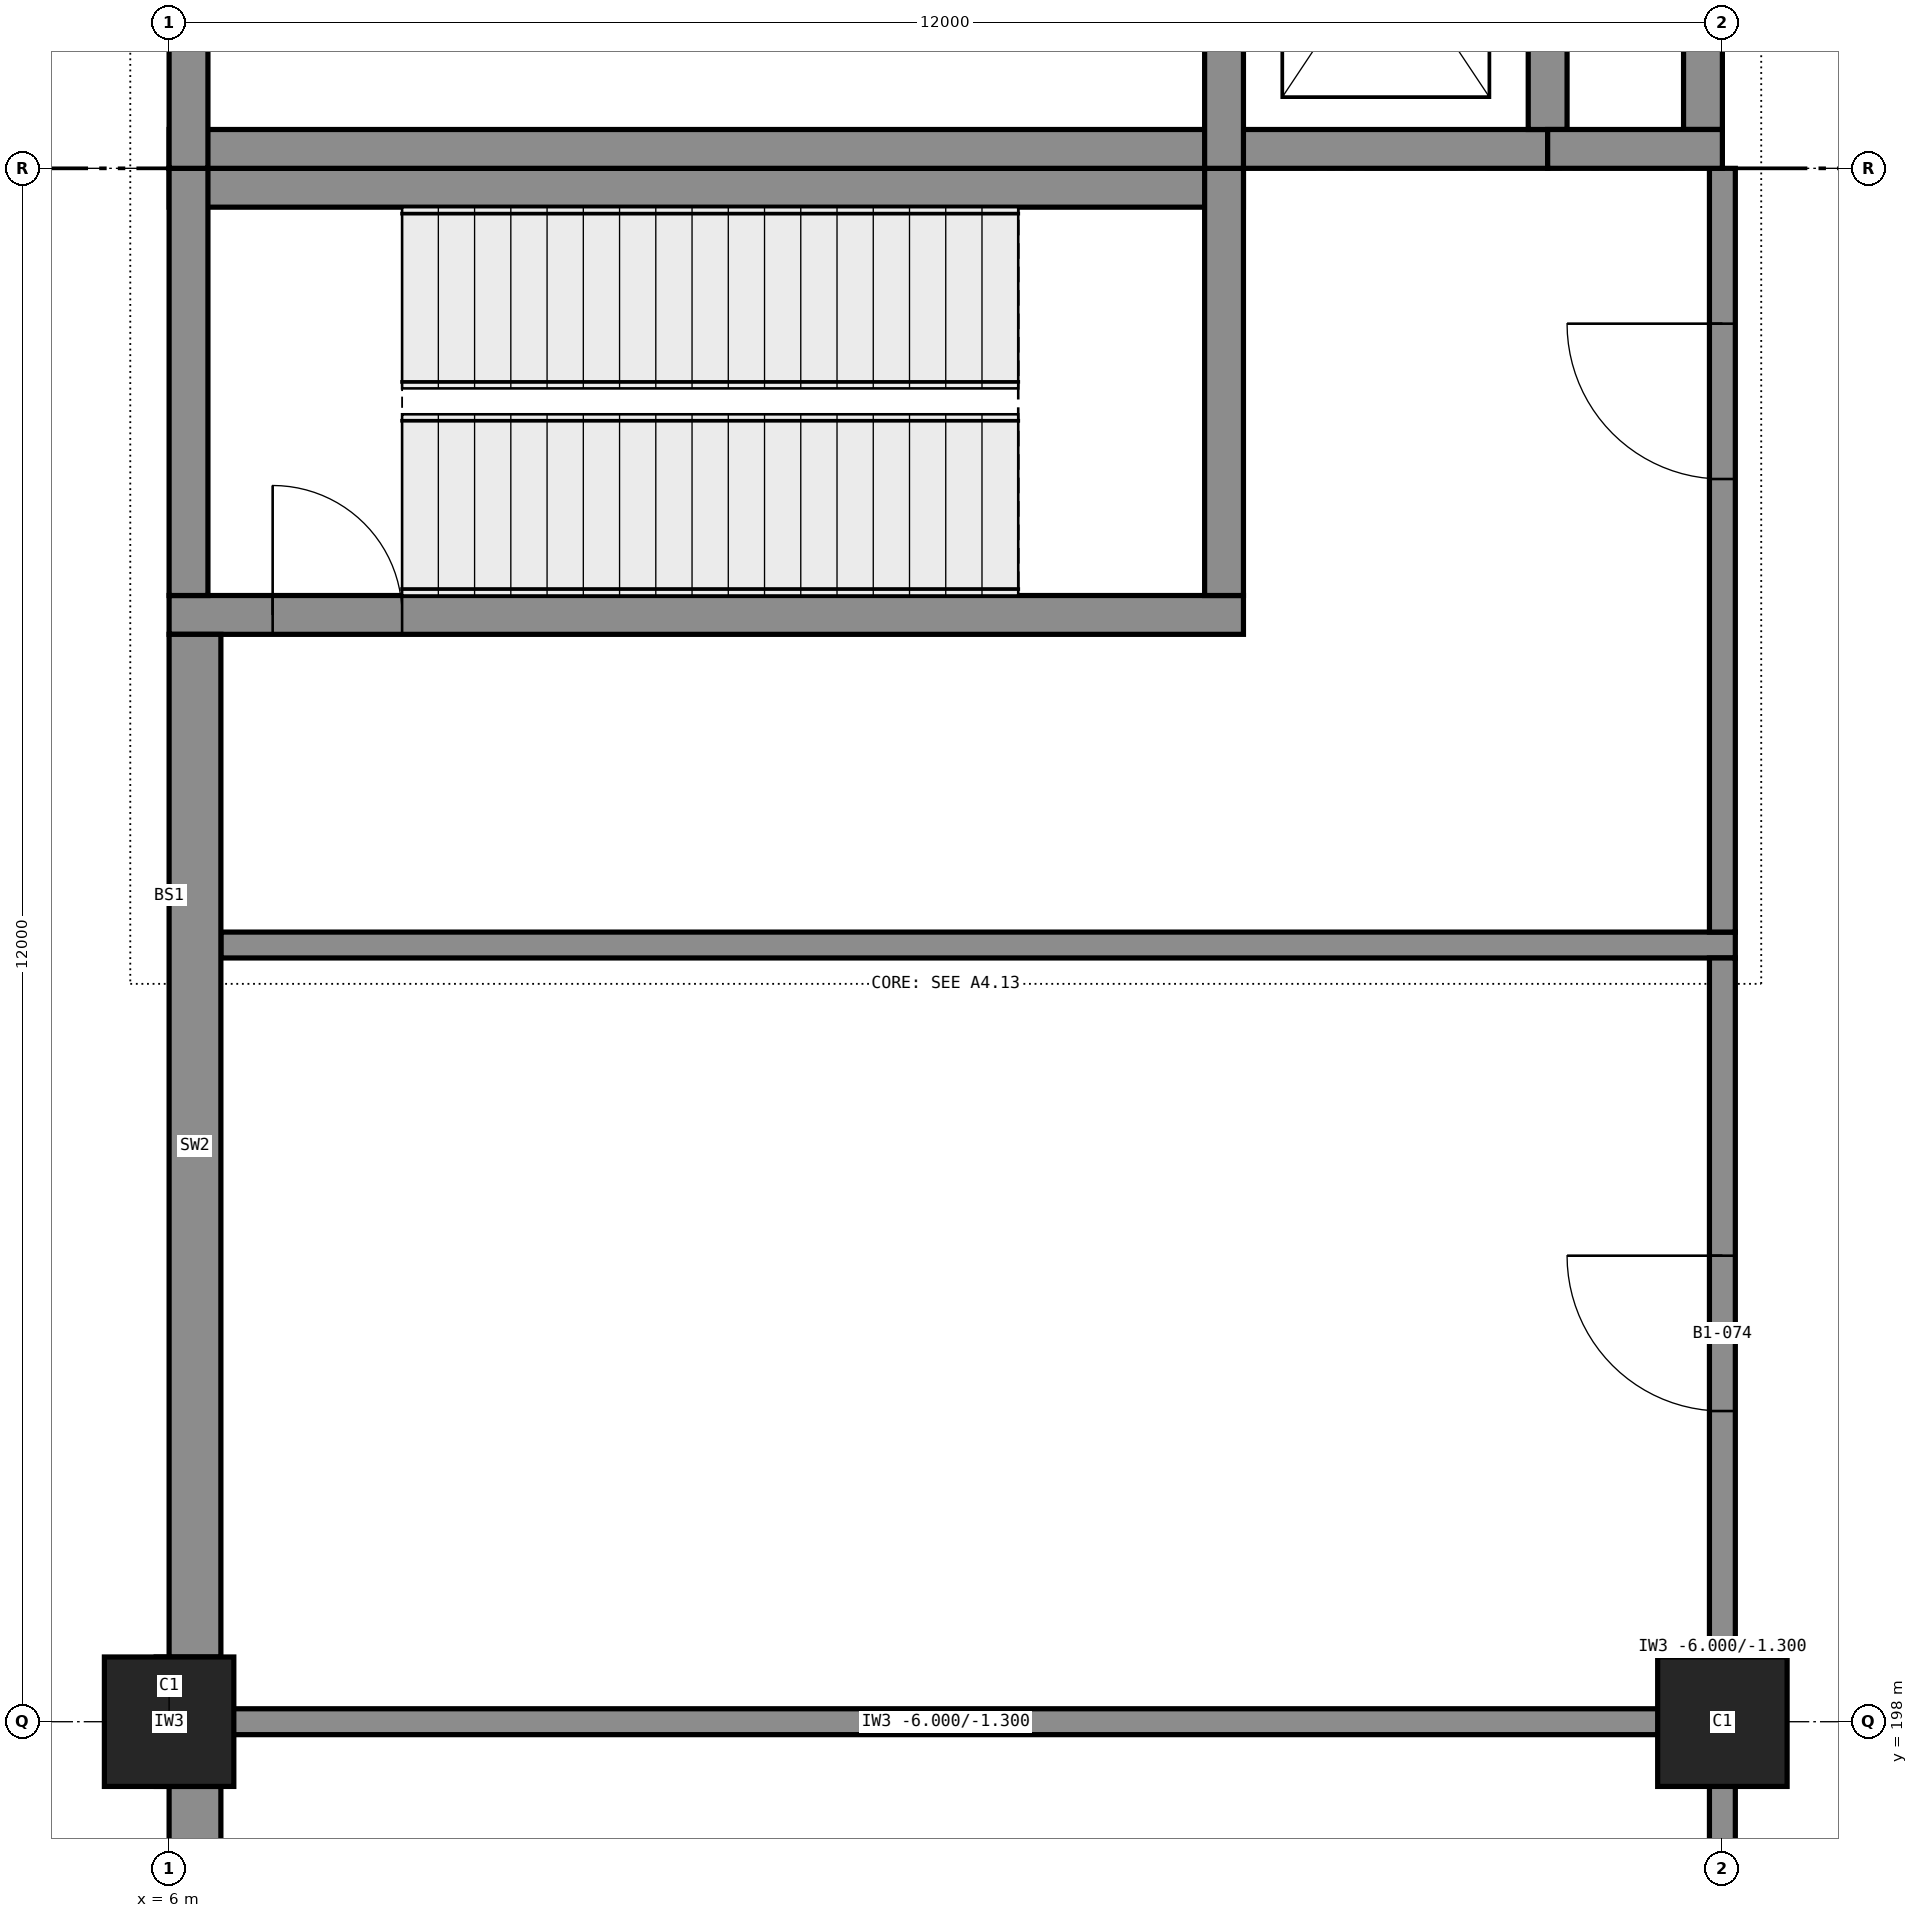
"""IFC4 building model, lengths in metres.
Left out: names, types, materials, properties, quantities, classifications, styles, units other than length and angle.
Written with IfcOpenShell. Run it as: python <this file> out.ifc"""

import sys

from ifc_helpers import new_model, si_unit, direction, frame, frame_2d, origin, origin_2d, place, context, subcontext, project, spatial, rectangle, extrude, element, fill, save


model = new_model("IFC4")
c1 = context("Model", 3, precision=1e-05, world=origin(), true_north=direction((0.0, 1.0)))
c2 = subcontext(c1, "Body", "Model", "MODEL_VIEW")
j1 = project(units=[si_unit("LENGTHUNIT", "METRE"), si_unit("PLANEANGLEUNIT", "RADIAN")], contexts=[c1])
p1 = place(None, origin())
s1 = spatial("IfcSite", under=j1, at=p1, CompositionType="ELEMENT")
p2 = place(p1, origin())
s2 = spatial("IfcBuilding", under=s1, at=p2, CompositionType="ELEMENT")
p3 = place(p2, frame((0.0, 0.0, -6.0)))
s3 = spatial("IfcBuildingStorey", under=s2, at=p3, CompositionType="ELEMENT", Elevation=-6.0)
for number, where, z_axis, x_axis in (
    (1, (6.0, 198.0, -0.4), (0.0, 0.0, 1.0), (1.0, 0.0, 0.0)),
    (2, (18.0, 198.0, -0.4), (0.0, 0.0, 1.0), (1.0, 0.0, 0.0)),
):
    element("IfcColumn", number, at=place(p3, frame(where, z_axis=z_axis, x_axis=x_axis)), inside=s3, PredefinedType="COLUMN", context=c2, shape_type="SweptSolid", body=[
        extrude(rectangle(XDim=1.0, YDim=1.0, at=origin_2d()), origin(), (0.0, 0.0, 1.0), 6.4),
    ])
p4 = place(p3, frame((6.0, 206.55, 0.0), z_axis=(0.0, 0.0, 1.0), x_axis=(1.0, 0.0, 0.0)))
e3 = element("IfcWall", 3, at=p4, inside=s3, PredefinedType="SHEAR", context=c2, shape_type="SweptSolid", body=[
    extrude(rectangle(XDim=8.3, YDim=0.3, at=frame_2d((4.15, 0.0))), origin(), (0.0, 0.0, 1.0), 5.7),
])
p5 = place(p4, frame((0.8, 0.0, 0.0)))
e4 = element("IfcOpeningElement", 4, at=p5, cuts=e3, PredefinedType="OPENING", context=c2, shape_type="SweptSolid", body=[
    extrude(rectangle(XDim=1.0, YDim=2.1, at=frame_2d((0.5, 1.05))), frame((0.0, 0.16, 0.0), z_axis=(0.0, -1.0, 0.0), x_axis=(1.0, 0.0, 0.0)), (0.0, 0.0, 1.0), 0.32),
])
p6 = place(p3, frame((6.0, 209.85, 0.0), z_axis=(0.0, 0.0, 1.0), x_axis=(1.0, 0.0, 0.0)))
e5 = element("IfcWall", 5, at=p6, inside=s3, PredefinedType="SHEAR", context=c2, shape_type="SweptSolid", body=[
    extrude(rectangle(XDim=8.3, YDim=0.3, at=frame_2d((4.15, 0.0))), origin(), (0.0, 0.0, 1.0), 5.7),
])
for number, where, z_axis, x_axis in (
    (6, (6.15, 206.7, 0.0), (0.0, 0.0, 1.0), (0.0, 1.0, 0.0)),
    (7, (14.15, 206.7, 0.0), (0.0, 0.0, 1.0), (0.0, 1.0, 0.0)),
):
    element("IfcWall", number, at=place(p3, frame(where, z_axis=z_axis, x_axis=x_axis)), inside=s3, PredefinedType="SHEAR", context=c2, shape_type="SweptSolid", body=[
        extrude(rectangle(XDim=3.3, YDim=0.3, at=frame_2d((1.65, 0.0))), origin(), (0.0, 0.0, 1.0), 5.7),
    ])
p7 = place(p3, frame((6.0, 210.15, 0.0), z_axis=(0.0, 0.0, 1.0), x_axis=(1.0, 0.0, 0.0)))
e8 = element("IfcWall", 8, at=p7, inside=s3, PredefinedType="SHEAR", context=c2, shape_type="SweptSolid", body=[
    extrude(rectangle(XDim=8.15, YDim=0.3, at=frame_2d((4.075, 0.0))), origin(), (0.0, 0.0, 1.0), 5.7),
])
p8 = place(p3, frame((14.15, 210.15, 0.0), z_axis=(0.0, 0.0, 1.0), x_axis=(1.0, 0.0, 0.0)))
e9 = element("IfcWall", 9, at=p8, inside=s3, PredefinedType="SHEAR", context=c2, shape_type="SweptSolid", body=[
    extrude(rectangle(XDim=2.5, YDim=0.3, at=frame_2d((1.25, 0.0))), origin(), (0.0, 0.0, 1.0), 5.7),
])
p9 = place(p3, frame((16.65, 210.15, 0.0), z_axis=(0.0, 0.0, 1.0), x_axis=(1.0, 0.0, 0.0)))
e10 = element("IfcWall", 10, at=p9, inside=s3, PredefinedType="SHEAR", context=c2, shape_type="SweptSolid", body=[
    extrude(rectangle(XDim=1.35, YDim=0.3, at=frame_2d((0.675, 0.0))), origin(), (0.0, 0.0, 1.0), 5.7),
])
p10 = place(p3, frame((6.15, 210.0, 0.0), z_axis=(0.0, 0.0, 1.0), x_axis=(0.0, 1.0, 0.0)))
e11 = element("IfcWall", 11, at=p10, inside=s3, PredefinedType="SHEAR", context=c2, shape_type="SweptSolid", body=[
    extrude(rectangle(XDim=3.45, YDim=0.3, at=frame_2d((1.725, 0.0))), origin(), (0.0, 0.0, 1.0), 5.7),
])
p11 = place(p3, frame((17.85, 210.3, 0.0), z_axis=(0.0, 0.0, 1.0), x_axis=(0.0, 1.0, 0.0)))
e12 = element("IfcWall", 12, at=p11, inside=s3, PredefinedType="SHEAR", context=c2, shape_type="SweptSolid", body=[
    extrude(rectangle(XDim=3.15, YDim=0.3, at=frame_2d((1.575, 0.0))), origin(), (0.0, 0.0, 1.0), 5.7),
])
p12 = place(p3, frame((14.15, 210.0, 0.0), z_axis=(0.0, 0.0, 1.0), x_axis=(0.0, 1.0, 0.0)))
e13 = element("IfcWall", 13, at=p12, inside=s3, PredefinedType="SHEAR", context=c2, shape_type="SweptSolid", body=[
    extrude(rectangle(XDim=3.3, YDim=0.3, at=frame_2d((1.65, 0.0))), origin(), (0.0, 0.0, 1.0), 5.7),
])
p13 = place(p3, frame((16.65, 210.3, 0.0), z_axis=(0.0, 0.0, 1.0), x_axis=(0.0, 1.0, 0.0)))
e14 = element("IfcWall", 14, at=p13, inside=s3, PredefinedType="SHEAR", context=c2, shape_type="SweptSolid", body=[
    extrude(rectangle(XDim=3.0, YDim=0.3, at=frame_2d((1.5, 0.0))), origin(), (0.0, 0.0, 1.0), 5.7),
])
p14 = place(p3, frame((6.2, 186.5, 0.0), z_axis=(0.0, 0.0, 1.0), x_axis=(0.0, 1.0, 0.0)))
e15 = element("IfcWall", 15, at=p14, inside=s3, PredefinedType="SOLIDWALL", context=c2, shape_type="SweptSolid", body=[
    extrude(rectangle(XDim=11.0, YDim=0.4, at=frame_2d((5.5, 0.0))), origin(), (0.0, 0.0, 1.0), 5.7),
])
p15 = place(p3, frame((6.2, 198.5, 0.0), z_axis=(0.0, 0.0, 1.0), x_axis=(0.0, 1.0, 0.0)))
e16 = element("IfcWall", 16, at=p15, inside=s3, PredefinedType="SOLIDWALL", context=c2, shape_type="SweptSolid", body=[
    extrude(rectangle(XDim=7.9, YDim=0.4, at=frame_2d((3.95, 0.0))), origin(), (0.0, 0.0, 1.0), 5.7),
])
p16 = place(p3, frame((6.1, 198.0, 0.0), z_axis=(0.0, 0.0, 1.0), x_axis=(1.0, 0.0, 0.0)))
e17 = element("IfcWall", 17, at=p16, inside=s3, PredefinedType="PARTITIONING", context=c2, shape_type="SweptSolid", body=[
    extrude(rectangle(XDim=11.8, YDim=0.2, at=frame_2d((5.9, 0.0))), origin(), (0.0, 0.0, 1.0), 4.7),
])
p17 = place(p3, frame((6.4, 204.0, 0.0), z_axis=(0.0, 0.0, 1.0), x_axis=(1.0, 0.0, 0.0)))
e18 = element("IfcWall", 18, at=p17, inside=s3, PredefinedType="PARTITIONING", context=c2, shape_type="SweptSolid", body=[
    extrude(rectangle(XDim=11.7, YDim=0.2, at=frame_2d((5.85, 0.0))), origin(), (0.0, 0.0, 1.0), 5.7),
])
p18 = place(p3, frame((6.0, 197.5, 0.0), z_axis=(0.0, 0.0, 1.0), x_axis=(0.0, 1.0, 0.0)))
e19 = element("IfcWall", 19, at=p18, inside=s3, PredefinedType="PARTITIONING", context=c2, shape_type="SweptSolid", body=[
    extrude(rectangle(XDim=1.0, YDim=0.2, at=frame_2d((0.5, 0.0))), origin(), (0.0, 0.0, 1.0), 5.7),
])
p19 = place(p3, frame((18.0, 186.1, 0.0), z_axis=(0.0, 0.0, 1.0), x_axis=(0.0, 1.0, 0.0)))
e20 = element("IfcWall", 20, at=p19, inside=s3, PredefinedType="PARTITIONING", context=c2, shape_type="SweptSolid", body=[
    extrude(rectangle(XDim=17.8, YDim=0.2, at=frame_2d((8.9, 0.0))), origin(), (0.0, 0.0, 1.0), 4.7),
])
p20 = place(p19, frame((5.3, 0.0, 0.0)))
e21 = element("IfcOpeningElement", 21, at=p20, cuts=e20, PredefinedType="OPENING", context=c2, shape_type="SweptSolid", body=[
    extrude(rectangle(XDim=1.2, YDim=2.1, at=frame_2d((0.6, 1.05))), frame((0.0, 0.11, 0.0), z_axis=(0.0, -1.0, 0.0), x_axis=(1.0, 0.0, 0.0)), (0.0, 0.0, 1.0), 0.22),
])
p21 = place(p19, frame((14.3, 0.0, 0.0)))
e22 = element("IfcOpeningElement", 22, at=p21, cuts=e20, PredefinedType="OPENING", context=c2, shape_type="SweptSolid", body=[
    extrude(rectangle(XDim=1.2, YDim=2.1, at=frame_2d((0.6, 1.05))), frame((0.0, 0.11, 0.0), z_axis=(0.0, -1.0, 0.0), x_axis=(1.0, 0.0, 0.0)), (0.0, 0.0, 1.0), 0.22),
])
p22 = place(p3, frame((18.0, 204.1, 0.0), z_axis=(0.0, 0.0, 1.0), x_axis=(0.0, 1.0, 0.0)))
e23 = element("IfcWall", 23, at=p22, inside=s3, PredefinedType="PARTITIONING", context=c2, shape_type="SweptSolid", body=[
    extrude(rectangle(XDim=5.9, YDim=0.2, at=frame_2d((2.95, 0.0))), origin(), (0.0, 0.0, 1.0), 4.7),
])
p23 = place(p22, frame((3.5, 0.0, 0.0)))
e24 = element("IfcOpeningElement", 24, at=p23, cuts=e23, PredefinedType="OPENING", context=c2, shape_type="SweptSolid", body=[
    extrude(rectangle(XDim=1.2, YDim=2.1, at=frame_2d((0.6, 1.05))), frame((0.0, 0.11, 0.0), z_axis=(0.0, -1.0, 0.0), x_axis=(1.0, 0.0, 0.0)), (0.0, 0.0, 1.0), 0.22),
])
p24 = place(p21, origin())
e25 = element("IfcDoor", 25, at=p24, inside=s3, OperationType="SINGLE_SWING_LEFT", PredefinedType="DOOR", context=c2, shape_type="SweptSolid", body=[
    extrude(rectangle(XDim=1.2, YDim=2.1, at=frame_2d((0.6, 1.05))), frame((0.0, 0.025, 0.0), z_axis=(0.0, -1.0, 0.0), x_axis=(1.0, 0.0, 0.0)), (0.0, 0.0, 1.0), 0.05),
])
fill(e22, e25)
p25 = place(p5, origin())
e26 = element("IfcDoor", 26, at=p25, inside=s3, OperationType="SINGLE_SWING_RIGHT", PredefinedType="DOOR", context=c2, shape_type="SweptSolid", body=[
    extrude(rectangle(XDim=1.0, YDim=2.1, at=frame_2d((0.5, 1.05))), frame((0.0, 0.025, 0.0), z_axis=(0.0, -1.0, 0.0), x_axis=(1.0, 0.0, 0.0)), (0.0, 0.0, 1.0), 0.05),
])
fill(e4, e26)
p26 = place(p23, origin())
e27 = element("IfcDoor", 27, at=p26, inside=s3, OperationType="SINGLE_SWING_LEFT", PredefinedType="DOOR", context=c2, shape_type="SweptSolid", body=[
    extrude(rectangle(XDim=1.2, YDim=2.1, at=frame_2d((0.6, 1.05))), frame((0.0, 0.025, 0.0), z_axis=(0.0, -1.0, 0.0), x_axis=(1.0, 0.0, 0.0)), (0.0, 0.0, 1.0), 0.05),
])
fill(e24, e27)
save(model, sys.argv[1])
